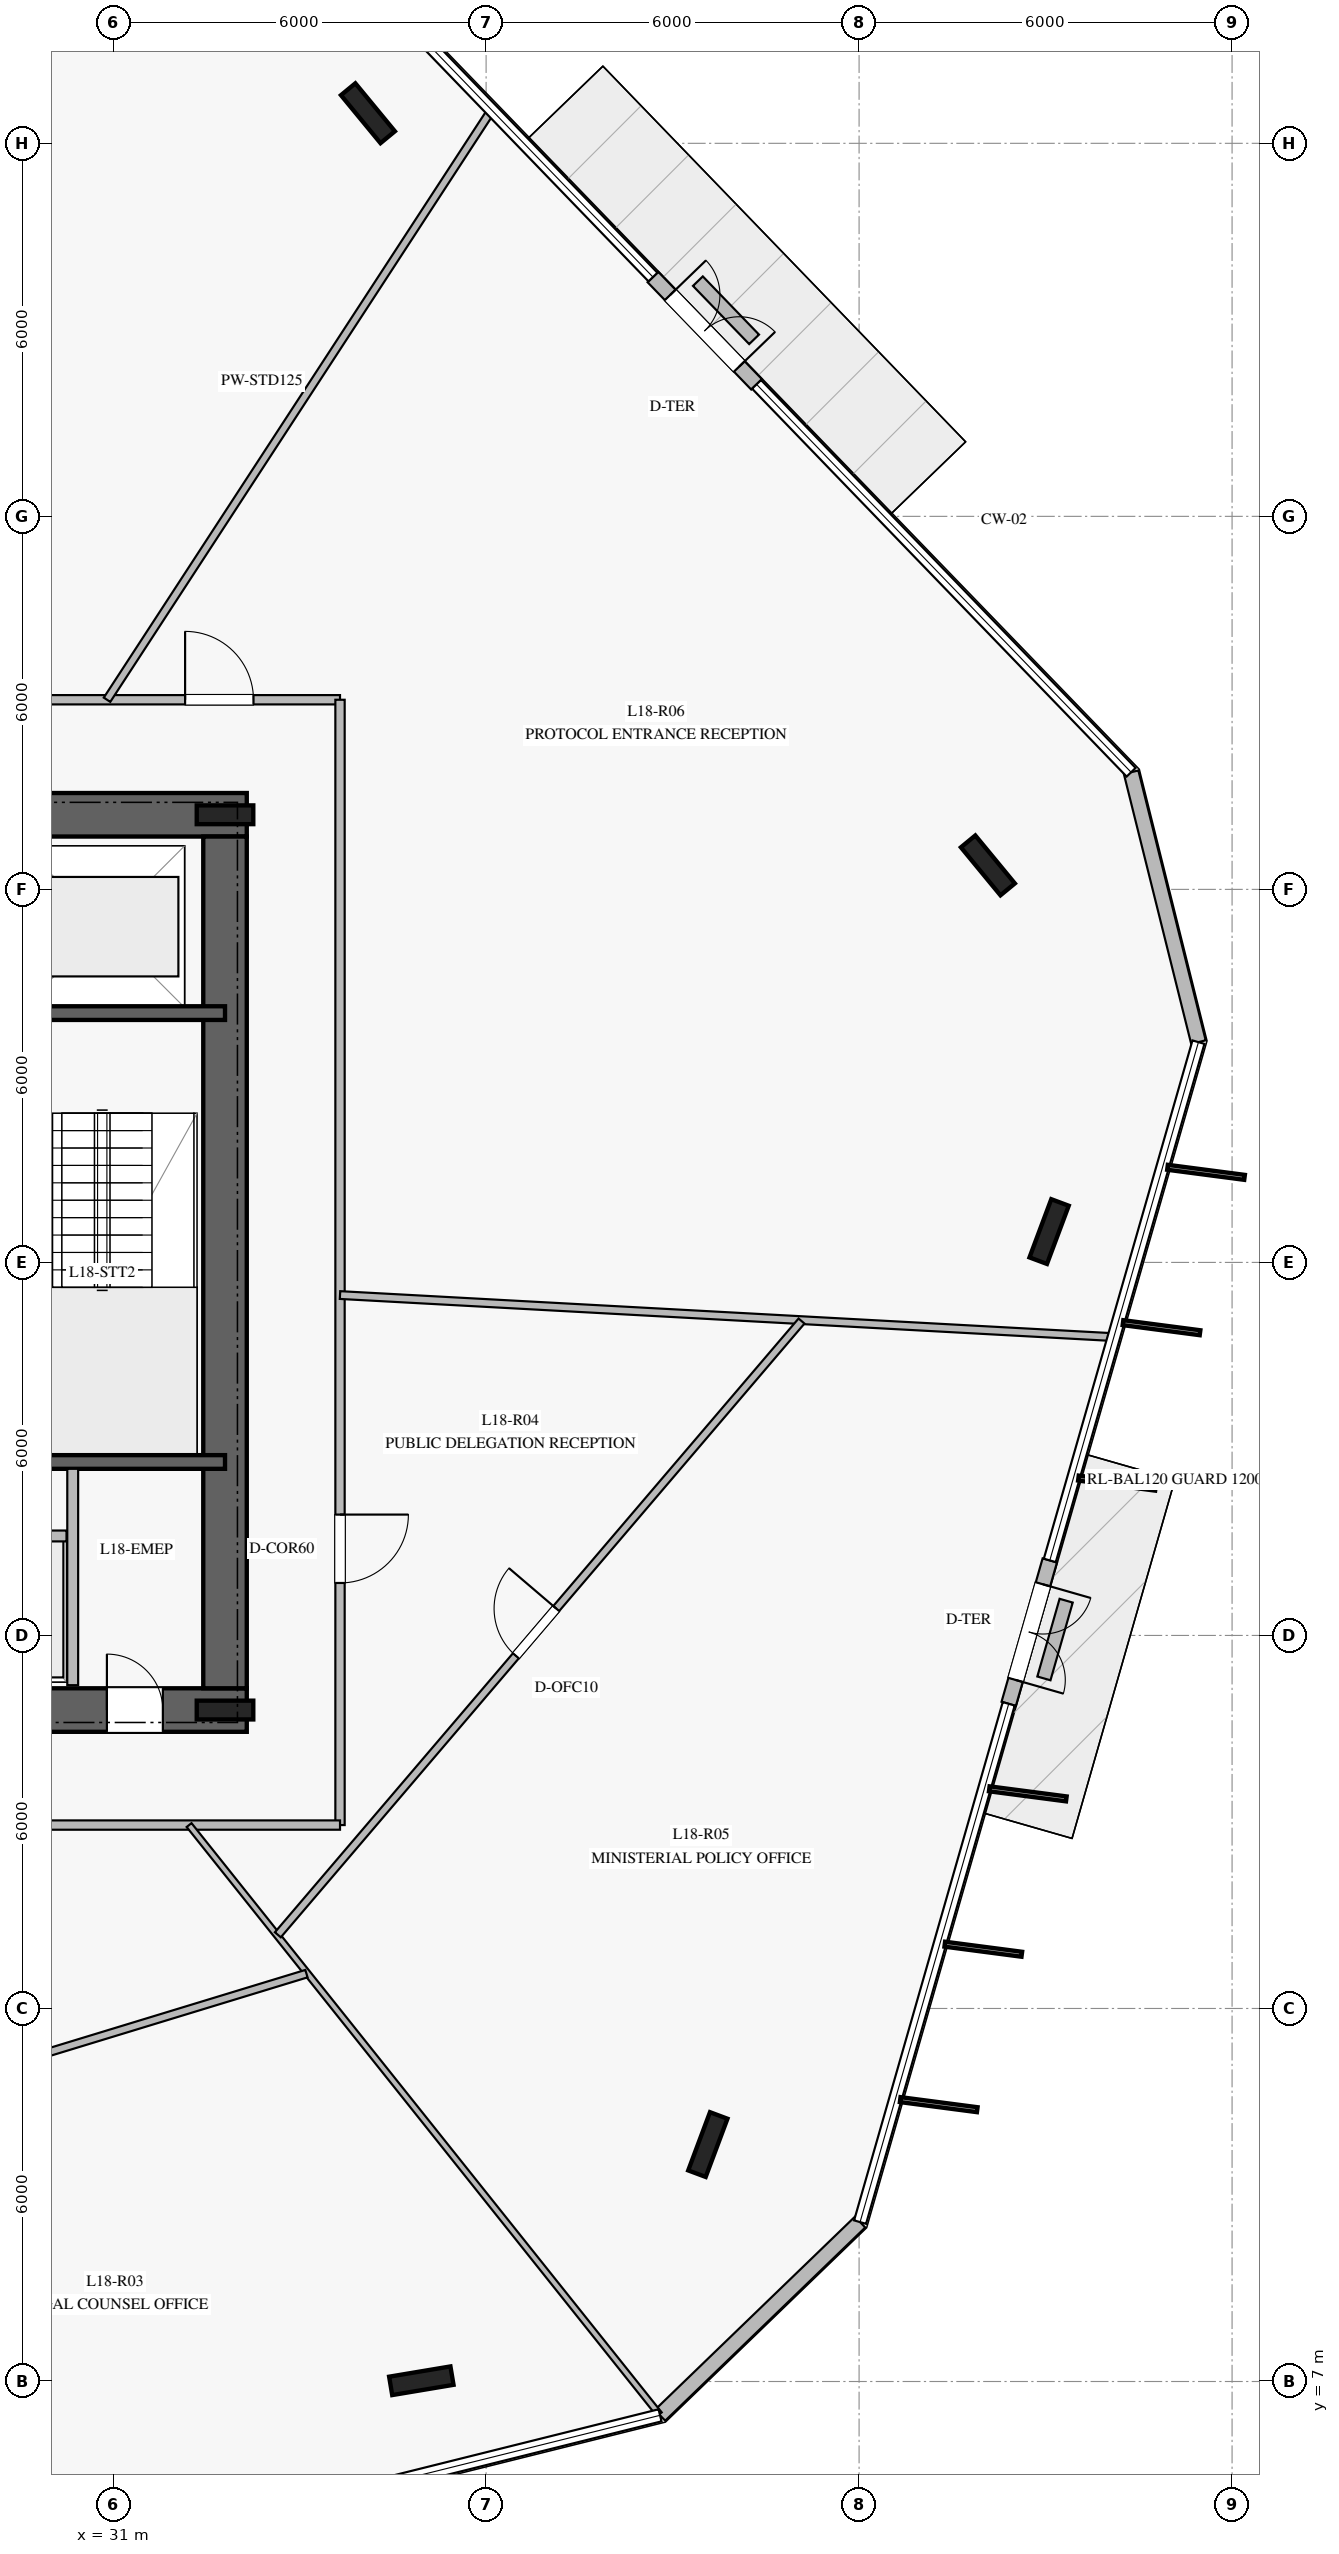
"""IFC4 building model, lengths in metres.
Left out: names, types, materials, properties, quantities, classifications, styles, units other than length and angle.
Written with IfcOpenShell. Run it as: python <this file> out.ifc"""

import sys

from ifc_helpers import new_model, si_unit, direction, frame, frame_2d, origin, origin_2d, place, context, subcontext, project, spatial, rectangle, i_section, extrude, element, fill, save


model = new_model("IFC4")
c1 = context("Model", 3, precision=1e-05, world=origin(), true_north=direction((0.0, 1.0)))
c2 = subcontext(c1, "Body", "Model", "MODEL_VIEW")
j1 = project(units=[si_unit("LENGTHUNIT", "METRE"), si_unit("PLANEANGLEUNIT", "RADIAN")], contexts=[c1])
p1 = place(None, origin())
s1 = spatial("IfcSite", under=j1, at=p1, CompositionType="ELEMENT")
p2 = place(p1, origin())
s2 = spatial("IfcBuilding", under=s1, at=p2, CompositionType="ELEMENT")
p3 = place(p2, frame((0.0, 0.0, 76.0)))
s3 = spatial("IfcBuildingStorey", under=s2, at=p3, CompositionType="ELEMENT", Elevation=76.0)
p4 = place(p3, frame((16.85, 17.8, 0.0), z_axis=(0.0, 0.0, 1.0), x_axis=(1.0, 0.0, 0.0)))
e1 = element("IfcWall", 1, at=p4, inside=s3, PredefinedType="SHEAR", context=c2, shape_type="SweptSolid", body=[
    extrude(rectangle(XDim=16.3, YDim=0.7, at=frame_2d((8.15, 0.0))), origin(), (0.0, 0.0, 1.0), 3.76),
])
p5 = place(p4, frame((5.1, 0.0, 0.0)))
e2 = element("IfcOpeningElement", 2, at=p5, cuts=e1, PredefinedType="OPENING", context=c2, shape_type="SweptSolid", body=[
    extrude(rectangle(XDim=1.2, YDim=2.25, at=frame_2d((0.6, 1.125))), frame((0.0, 0.36, 0.0), z_axis=(0.0, -1.0, 0.0), x_axis=(1.0, 0.0, 0.0)), (0.0, 0.0, 1.0), 0.72),
])
p6 = place(p4, frame((14.05, 0.0, 0.0)))
e3 = element("IfcOpeningElement", 3, at=p6, cuts=e1, PredefinedType="OPENING", context=c2, shape_type="SweptSolid", body=[
    extrude(rectangle(XDim=0.9, YDim=2.1, at=frame_2d((0.45, 1.05))), frame((0.0, 0.36, 0.0), z_axis=(0.0, -1.0, 0.0), x_axis=(1.0, 0.0, 0.0)), (0.0, 0.0, 1.0), 0.72),
])
p7 = place(p4, frame((7.95, 0.0, 0.0)))
e4 = element("IfcOpeningElement", 4, at=p7, cuts=e1, PredefinedType="OPENING", context=c2, shape_type="SweptSolid", body=[
    extrude(rectangle(XDim=1.1, YDim=2.2, at=frame_2d((0.55, 1.1))), frame((0.0, 0.36, 0.0), z_axis=(0.0, -1.0, 0.0), x_axis=(1.0, 0.0, 0.0)), (0.0, 0.0, 1.0), 0.72),
])
p8 = place(p4, frame((9.925, 0.0, 0.0)))
e5 = element("IfcOpeningElement", 5, at=p8, cuts=e1, PredefinedType="OPENING", context=c2, shape_type="SweptSolid", body=[
    extrude(rectangle(XDim=1.1, YDim=2.2, at=frame_2d((0.55, 1.1))), frame((0.0, 0.36, 0.0), z_axis=(0.0, -1.0, 0.0), x_axis=(1.0, 0.0, 0.0)), (0.0, 0.0, 1.0), 0.72),
])
p9 = place(p4, frame((11.9, 0.0, 0.0)))
e6 = element("IfcOpeningElement", 6, at=p9, cuts=e1, PredefinedType="OPENING", context=c2, shape_type="SweptSolid", body=[
    extrude(rectangle(XDim=1.1, YDim=2.2, at=frame_2d((0.55, 1.1))), frame((0.0, 0.36, 0.0), z_axis=(0.0, -1.0, 0.0), x_axis=(1.0, 0.0, 0.0)), (0.0, 0.0, 1.0), 0.72),
])
p10 = place(p3, frame((33.15, 32.2, 0.0), z_axis=(0.0, 0.0, 1.0), x_axis=(-1.0, 0.0, 0.0)))
e7 = element("IfcWall", 7, at=p10, inside=s3, PredefinedType="SHEAR", context=c2, shape_type="SweptSolid", body=[
    extrude(rectangle(XDim=16.3, YDim=0.7, at=frame_2d((8.15, 0.0))), origin(), (0.0, 0.0, 1.0), 3.76),
])
p11 = place(p10, frame((5.1, 0.0, 0.0)))
e8 = element("IfcOpeningElement", 8, at=p11, cuts=e7, PredefinedType="OPENING", context=c2, shape_type="SweptSolid", body=[
    extrude(rectangle(XDim=1.2, YDim=2.25, at=frame_2d((0.6, 1.125))), frame((0.0, 0.36, 0.0), z_axis=(0.0, -1.0, 0.0), x_axis=(1.0, 0.0, 0.0)), (0.0, 0.0, 1.0), 0.72),
])
p12 = place(p3, frame((32.8, 18.15, 0.0), z_axis=(0.0, 0.0, 1.0), x_axis=(0.0, 1.0, 0.0)))
e9 = element("IfcWall", 9, at=p12, inside=s3, PredefinedType="SHEAR", context=c2, shape_type="SweptSolid", body=[
    extrude(rectangle(XDim=13.7, YDim=0.7, at=frame_2d((6.85, 0.0))), origin(), (0.0, 0.0, 1.0), 3.76),
])
for number, where, z_axis, x_axis in (
    (10, (32.8, 17.8, 0.0), (0.0, 0.0, 1.0), (1.0, 0.0, 0.0)),
    (11, (32.8, 32.2, 0.0), (0.0, 0.0, 1.0), (1.0, 0.0, 0.0)),
):
    element("IfcColumn", number, at=place(p3, frame(where, z_axis=z_axis, x_axis=x_axis)), inside=s3, PredefinedType="COLUMN", context=c2, shape_type="SweptSolid", body=[
        extrude(i_section(OverallWidth=0.302, OverallDepth=0.91, WebThickness=0.021, FlangeThickness=0.04, at=origin_2d()), origin(), (0.0, 0.0, 1.0), 4.0),
    ])
for number, where, z_axis, x_axis in (
    (12, (29.08, 21.79, 0.0), (0.0, 0.0, 1.0), (1.0, 0.0, 0.0)),
    (13, (29.08, 29.01, 0.0), (0.0, 0.0, 1.0), (1.0, 0.0, 0.0)),
):
    element("IfcWall", number, at=place(p3, frame(where, z_axis=z_axis, x_axis=x_axis)), inside=s3, PredefinedType="SOLIDWALL", context=c2, shape_type="SweptSolid", body=[
        extrude(rectangle(XDim=3.72, YDim=0.22, at=frame_2d((1.86, 0.0))), origin(), (0.0, 0.0, 1.0), 3.76),
    ])
for number, where, z_axis, x_axis in (
    (14, (45.072, 31.386, 0.0), (0.0, 0.0, 1.0), (-0.636, 0.772, 0.0)),
    (15, (35.099, 43.484, 0.0), (0.0, 0.0, 1.0), (-0.636, 0.772, 0.0)),
    (16, (35.958, 7.012, 0.0), (0.0, 0.0, 1.0), (0.986, 0.165, 0.0)),
    (17, (40.567, 10.811, 0.0), (0.0, 0.0, 1.0), (0.35, 0.937, 0.0)),
    (18, (46.057, 25.496, 0.0), (0.0, 0.0, 1.0), (0.35, 0.937, 0.0)),
):
    element("IfcColumn", number, at=place(p3, frame(where, z_axis=z_axis, x_axis=x_axis)), inside=s3, PredefinedType="COLUMN", context=c2, shape_type="SweptSolid", body=[
        extrude(i_section(OverallWidth=0.3, OverallDepth=1.0, WebThickness=0.019, FlangeThickness=0.036, at=origin_2d()), origin(), (0.0, 0.0, 1.0), 4.0),
    ])
p13 = place(p3, frame((41.351, 39.123, 0.0), z_axis=(0.0, 0.0, 1.0), x_axis=(-0.694688923552, 0.719310294305, 0.0)))
e19 = element("IfcWall", 19, at=p13, inside=s3, PredefinedType="STANDARD", context=c2, shape_type="SweptSolid", body=[
    extrude(rectangle(XDim=2.4, YDim=0.24, at=frame_2d((1.2, 0.0))), origin(), (0.0, 0.0, 1.0), 3.76),
])
p14 = place(p13, frame((0.4, 0.0, 0.0)))
e20 = element("IfcOpeningElement", 20, at=p14, cuts=e19, PredefinedType="OPENING", context=c2, shape_type="SweptSolid", body=[
    extrude(rectangle(XDim=1.6, YDim=2.25, at=frame_2d((0.8, 1.125))), frame((0.0, 0.13, 0.0), z_axis=(0.0, -1.0, 0.0), x_axis=(1.0, 0.0, 0.0)), (0.0, 0.0, 1.0), 0.26),
])
p15 = place(p3, frame((39.798, 6.456, 0.0), z_axis=(0.0, 0.0, 1.0), x_axis=(0.719305542435, 0.694693843806, 0.0)))
e21 = element("IfcWall", 21, at=p15, inside=s3, PredefinedType="STANDARD", context=c2, shape_type="SweptSolid", body=[
    extrude(rectangle(XDim=4.474, YDim=0.24, at=frame_2d((2.237, 0.0))), origin(), (0.0, 0.0, 1.0), 3.76),
])
p16 = place(p3, frame((45.407, 17.9, 0.0), z_axis=(0.0, 0.0, 1.0), x_axis=(0.275473430744, 0.961308685571, 0.0)))
e22 = element("IfcWall", 22, at=p16, inside=s3, PredefinedType="STANDARD", context=c2, shape_type="SweptSolid", body=[
    extrude(rectangle(XDim=2.4, YDim=0.24, at=frame_2d((1.2, 0.0))), origin(), (0.0, 0.0, 1.0), 3.76),
])
p17 = place(p16, frame((0.4, 0.0, 0.0)))
e23 = element("IfcOpeningElement", 23, at=p17, cuts=e22, PredefinedType="OPENING", context=c2, shape_type="SweptSolid", body=[
    extrude(rectangle(XDim=1.6, YDim=2.25, at=frame_2d((0.8, 1.125))), frame((0.0, 0.13, 0.0), z_axis=(0.0, -1.0, 0.0), x_axis=(1.0, 0.0, 0.0)), (0.0, 0.0, 1.0), 0.26),
])
p18 = place(p3, frame((48.459, 28.543, 0.0), z_axis=(0.0, 0.0, 1.0), x_axis=(-0.242060539471, 0.970261147955, 0.0)))
e24 = element("IfcWall", 24, at=p18, inside=s3, PredefinedType="STANDARD", context=c2, shape_type="SweptSolid", body=[
    extrude(rectangle(XDim=4.474, YDim=0.24, at=frame_2d((2.237, 0.0))), origin(), (0.0, 0.0, 1.0), 3.76),
])
p19 = place(p3, frame((45.973, 18.309, 0.0), z_axis=(0.0, 0.0, 1.0), x_axis=(0.275440197567, 0.961318208277, 0.0)))
e25 = element("IfcWall", 25, at=p19, inside=s3, PredefinedType="USERDEFINED", context=c2, shape_type="SweptSolid", body=[
    extrude(rectangle(XDim=1.3, YDim=0.22, at=frame_2d((0.65, 0.0))), origin(), (0.0, 0.0, 1.0), 0.4),
])
p20 = place(p3, frame((41.311, 39.847, 0.0), z_axis=(0.0, 0.0, 1.0), x_axis=(-0.694711687204, 0.719288309138, 0.0)))
e26 = element("IfcWall", 26, at=p20, inside=s3, PredefinedType="USERDEFINED", context=c2, shape_type="SweptSolid", body=[
    extrude(rectangle(XDim=1.301, YDim=0.22, at=frame_2d((0.651, 0.0))), origin(), (0.0, 0.0, 1.0), 0.4),
])
p21 = place(p3, frame((30.35, 18.2, 0.0), z_axis=(0.0, 0.0, 1.0), x_axis=(0.0, 1.0, 0.0)))
e27 = element("IfcWall", 27, at=p21, inside=s3, PredefinedType="PARTITIONING", context=c2, shape_type="SweptSolid", body=[
    extrude(rectangle(XDim=3.48, YDim=0.175, at=frame_2d((1.74, 0.0))), origin(), (0.0, 0.0, 1.0), 3.76),
])
p22 = place(p3, frame((28.35, 20.6, 0.0), z_axis=(0.0, 0.0, 1.0), x_axis=(1.0, 0.0, 0.0)))
e28 = element("IfcWall", 28, at=p22, inside=s3, PredefinedType="PARTITIONING", context=c2, shape_type="SweptSolid", body=[
    extrude(rectangle(XDim=1.9, YDim=0.175, at=frame_2d((0.95, 0.0))), origin(), (0.0, 0.0, 1.0), 3.76),
])
p23 = place(p3, frame((15.35, 34.05, 0.0), z_axis=(0.0, 0.0, 1.0), x_axis=(1.0, 0.0, 0.0)))
e29 = element("IfcWall", 29, at=p23, inside=s3, PredefinedType="PARTITIONING", context=c2, shape_type="SweptSolid", body=[
    extrude(rectangle(XDim=19.3, YDim=0.15, at=frame_2d((9.65, 0.0))), origin(), (0.0, 0.0, 1.0), 3.21),
])
p24 = place(p23, frame((16.808, 0.0, 0.0)))
e30 = element("IfcOpeningElement", 30, at=p24, cuts=e29, PredefinedType="OPENING", context=c2, shape_type="SweptSolid", body=[
    extrude(rectangle(XDim=1.1, YDim=2.2, at=frame_2d((0.55, 1.1))), frame((0.0, 0.085, 0.0), z_axis=(0.0, -1.0, 0.0), x_axis=(1.0, 0.0, 0.0)), (0.0, 0.0, 1.0), 0.17),
])
p25 = place(p23, frame((10.941, 0.0, 0.0)))
e31 = element("IfcOpeningElement", 31, at=p25, cuts=e29, PredefinedType="OPENING", context=c2, shape_type="SweptSolid", body=[
    extrude(rectangle(XDim=1.1, YDim=2.2, at=frame_2d((0.55, 1.1))), frame((0.0, 0.085, 0.0), z_axis=(0.0, -1.0, 0.0), x_axis=(1.0, 0.0, 0.0)), (0.0, 0.0, 1.0), 0.17),
])
p26 = place(p23, frame((3.321, 0.0, 0.0)))
e32 = element("IfcOpeningElement", 32, at=p26, cuts=e29, PredefinedType="OPENING", context=c2, shape_type="SweptSolid", body=[
    extrude(rectangle(XDim=1.1, YDim=2.2, at=frame_2d((0.55, 1.1))), frame((0.0, 0.085, 0.0), z_axis=(0.0, -1.0, 0.0), x_axis=(1.0, 0.0, 0.0)), (0.0, 0.0, 1.0), 0.17),
])
p27 = place(p3, frame((34.65, 34.05, 0.0), z_axis=(0.0, 0.0, 1.0), x_axis=(0.0, -1.0, 0.0)))
e33 = element("IfcWall", 33, at=p27, inside=s3, PredefinedType="PARTITIONING", context=c2, shape_type="SweptSolid", body=[
    extrude(rectangle(XDim=18.1, YDim=0.15, at=frame_2d((9.05, 0.0))), origin(), (0.0, 0.0, 1.0), 3.21),
])
p28 = place(p27, frame((13.106, 0.0, 0.0)))
e34 = element("IfcOpeningElement", 34, at=p28, cuts=e33, PredefinedType="OPENING", context=c2, shape_type="SweptSolid", body=[
    extrude(rectangle(XDim=1.1, YDim=2.2, at=frame_2d((0.55, 1.1))), frame((0.0, 0.085, 0.0), z_axis=(0.0, -1.0, 0.0), x_axis=(1.0, 0.0, 0.0)), (0.0, 0.0, 1.0), 0.17),
])
p29 = place(p3, frame((34.65, 15.95, 0.0), z_axis=(0.0, 0.0, 1.0), x_axis=(-1.0, 0.0, 0.0)))
e35 = element("IfcWall", 35, at=p29, inside=s3, PredefinedType="PARTITIONING", context=c2, shape_type="SweptSolid", body=[
    extrude(rectangle(XDim=19.3, YDim=0.15, at=frame_2d((9.65, 0.0))), origin(), (0.0, 0.0, 1.0), 3.21),
])
p30 = place(p29, frame((14.506, 0.0, 0.0)))
e36 = element("IfcOpeningElement", 36, at=p30, cuts=e35, PredefinedType="OPENING", context=c2, shape_type="SweptSolid", body=[
    extrude(rectangle(XDim=1.1, YDim=2.2, at=frame_2d((0.55, 1.1))), frame((0.0, 0.085, 0.0), z_axis=(0.0, -1.0, 0.0), x_axis=(1.0, 0.0, 0.0)), (0.0, 0.0, 1.0), 0.17),
])
p31 = place(p29, frame((6.218, 0.0, 0.0)))
e37 = element("IfcOpeningElement", 37, at=p31, cuts=e35, PredefinedType="OPENING", context=c2, shape_type="SweptSolid", body=[
    extrude(rectangle(XDim=1.1, YDim=2.2, at=frame_2d((0.55, 1.1))), frame((0.0, 0.085, 0.0), z_axis=(0.0, -1.0, 0.0), x_axis=(1.0, 0.0, 0.0)), (0.0, 0.0, 1.0), 0.17),
])
p32 = place(p3, frame((30.902, 34.05, 0.0), z_axis=(0.0, 0.0, 1.0), x_axis=(0.54628622195, 0.837598569547, 0.0)))
e38 = element("IfcWall", 38, at=p32, inside=s3, PredefinedType="PARTITIONING", context=c2, shape_type="SweptSolid", body=[
    extrude(rectangle(XDim=11.307, YDim=0.125, at=frame_2d((5.654, 0.0))), origin(), (0.0, 0.0, 1.0), 3.05),
])
p33 = place(p3, frame((32.222, 15.95, 0.0), z_axis=(0.0, 0.0, 1.0), x_axis=(0.623766515339, -0.781610730698, 0.0)))
e39 = element("IfcWall", 39, at=p33, inside=s3, PredefinedType="MOVABLE", context=c2, shape_type="SweptSolid", body=[
    extrude(rectangle(XDim=12.126, YDim=0.1, at=frame_2d((6.063, 0.0))), origin(), (0.0, 0.0, 1.0), 3.06),
])
p34 = place(p3, frame((34.65, 24.475, 0.0), z_axis=(0.0, 0.0, 1.0), x_axis=(0.998524363599, -0.054305573375, 0.0)))
e40 = element("IfcWall", 40, at=p34, inside=s3, PredefinedType="PARTITIONING", context=c2, shape_type="SweptSolid", body=[
    extrude(rectangle(XDim=12.448, YDim=0.125, at=frame_2d((6.224, 0.0))), origin(), (0.0, 0.0, 1.0), 3.06),
])
p35 = place(p3, frame((22.197, 9.927, 0.0), z_axis=(0.0, 0.0, 1.0), x_axis=(0.956509687219, 0.291700562659, 0.0)))
e41 = element("IfcWall", 41, at=p35, inside=s3, PredefinedType="PARTITIONING", context=c2, shape_type="SweptSolid", body=[
    extrude(rectangle(XDim=12.455, YDim=0.125, at=frame_2d((6.228, 0.0))), origin(), (0.0, 0.0, 1.0), 3.21),
])
p36 = place(p35, frame((5.727, 0.0, 0.0)))
e42 = element("IfcOpeningElement", 42, at=p36, cuts=e41, PredefinedType="OPENING", context=c2, shape_type="SweptSolid", body=[
    extrude(rectangle(XDim=1.0, YDim=2.15, at=frame_2d((0.5, 1.075))), frame((0.0, 0.073, 0.0), z_axis=(0.0, -1.0, 0.0), x_axis=(1.0, 0.0, 0.0)), (0.0, 0.0, 1.0), 0.145),
])
p37 = place(p3, frame((33.65, 14.185, 0.0), z_axis=(0.0, 0.0, 1.0), x_axis=(0.649124350688, 0.760682310392, 0.0)))
e43 = element("IfcWall", 43, at=p37, inside=s3, PredefinedType="PARTITIONING", context=c2, shape_type="SweptSolid", body=[
    extrude(rectangle(XDim=12.978, YDim=0.125, at=frame_2d((6.489, 0.0))), origin(), (0.0, 0.0, 1.0), 3.21),
])
p38 = place(p37, frame((5.899, 0.0, 0.0)))
e44 = element("IfcOpeningElement", 44, at=p38, cuts=e43, PredefinedType="OPENING", context=c2, shape_type="SweptSolid", body=[
    extrude(rectangle(XDim=1.0, YDim=2.15, at=frame_2d((0.5, 1.075))), frame((0.0, 0.073, 0.0), z_axis=(0.0, -1.0, 0.0), x_axis=(1.0, 0.0, 0.0)), (0.0, 0.0, 1.0), 0.145),
])
p39 = place(p14, frame((1.6, 0.0, 0.0), z_axis=(0.0, 0.0, 1.0), x_axis=(-1.0, 0.0, 0.0)))
e45 = element("IfcDoor", 45, at=p39, inside=s3, OperationType="DOUBLE_DOOR_SINGLE_SWING", PredefinedType="DOOR", context=c2, shape_type="SweptSolid", body=[
    extrude(rectangle(XDim=1.6, YDim=2.25, at=frame_2d((0.8, 1.125))), frame((0.0, 0.025, 0.0), z_axis=(0.0, -1.0, 0.0), x_axis=(1.0, 0.0, 0.0)), (0.0, 0.0, 1.0), 0.05),
])
fill(e20, e45)
p40 = place(p17, frame((1.6, 0.0, 0.0), z_axis=(0.0, 0.0, 1.0), x_axis=(-1.0, 0.0, 0.0)))
e46 = element("IfcDoor", 46, at=p40, inside=s3, OperationType="DOUBLE_DOOR_SINGLE_SWING", PredefinedType="DOOR", context=c2, shape_type="SweptSolid", body=[
    extrude(rectangle(XDim=1.6, YDim=2.25, at=frame_2d((0.8, 1.125))), frame((0.0, 0.025, 0.0), z_axis=(0.0, -1.0, 0.0), x_axis=(1.0, 0.0, 0.0)), (0.0, 0.0, 1.0), 0.05),
])
fill(e23, e46)
p41 = place(p6, origin())
e47 = element("IfcDoor", 47, at=p41, inside=s3, OperationType="SINGLE_SWING_LEFT", PredefinedType="DOOR", context=c2, shape_type="SweptSolid", body=[
    extrude(rectangle(XDim=0.9, YDim=2.1, at=frame_2d((0.45, 1.05))), frame((0.0, 0.025, 0.0), z_axis=(0.0, -1.0, 0.0), x_axis=(1.0, 0.0, 0.0)), (0.0, 0.0, 1.0), 0.05),
])
fill(e3, e47)
p42 = place(p28, origin())
e48 = element("IfcDoor", 48, at=p42, inside=s3, OperationType="SINGLE_SWING_LEFT", PredefinedType="DOOR", context=c2, shape_type="SweptSolid", body=[
    extrude(rectangle(XDim=1.1, YDim=2.2, at=frame_2d((0.55, 1.1))), frame((0.0, 0.025, 0.0), z_axis=(0.0, -1.0, 0.0), x_axis=(1.0, 0.0, 0.0)), (0.0, 0.0, 1.0), 0.05),
])
fill(e34, e48)
p43 = place(p38, origin())
e49 = element("IfcDoor", 49, at=p43, inside=s3, OperationType="SINGLE_SWING_RIGHT", PredefinedType="DOOR", context=c2, shape_type="SweptSolid", body=[
    extrude(rectangle(XDim=1.0, YDim=2.15, at=frame_2d((0.5, 1.075))), frame((0.0, 0.025, 0.0), z_axis=(0.0, -1.0, 0.0), x_axis=(1.0, 0.0, 0.0)), (0.0, 0.0, 1.0), 0.05),
])
fill(e44, e49)
p44 = place(p24, origin())
e50 = element("IfcDoor", 50, at=p44, inside=s3, OperationType="SINGLE_SWING_LEFT", PredefinedType="DOOR", context=c2, shape_type="SweptSolid", body=[
    extrude(rectangle(XDim=1.1, YDim=2.2, at=frame_2d((0.55, 1.1))), frame((0.0, 0.025, 0.0), z_axis=(0.0, -1.0, 0.0), x_axis=(1.0, 0.0, 0.0)), (0.0, 0.0, 1.0), 0.05),
])
fill(e30, e50)
save(model, sys.argv[1])
